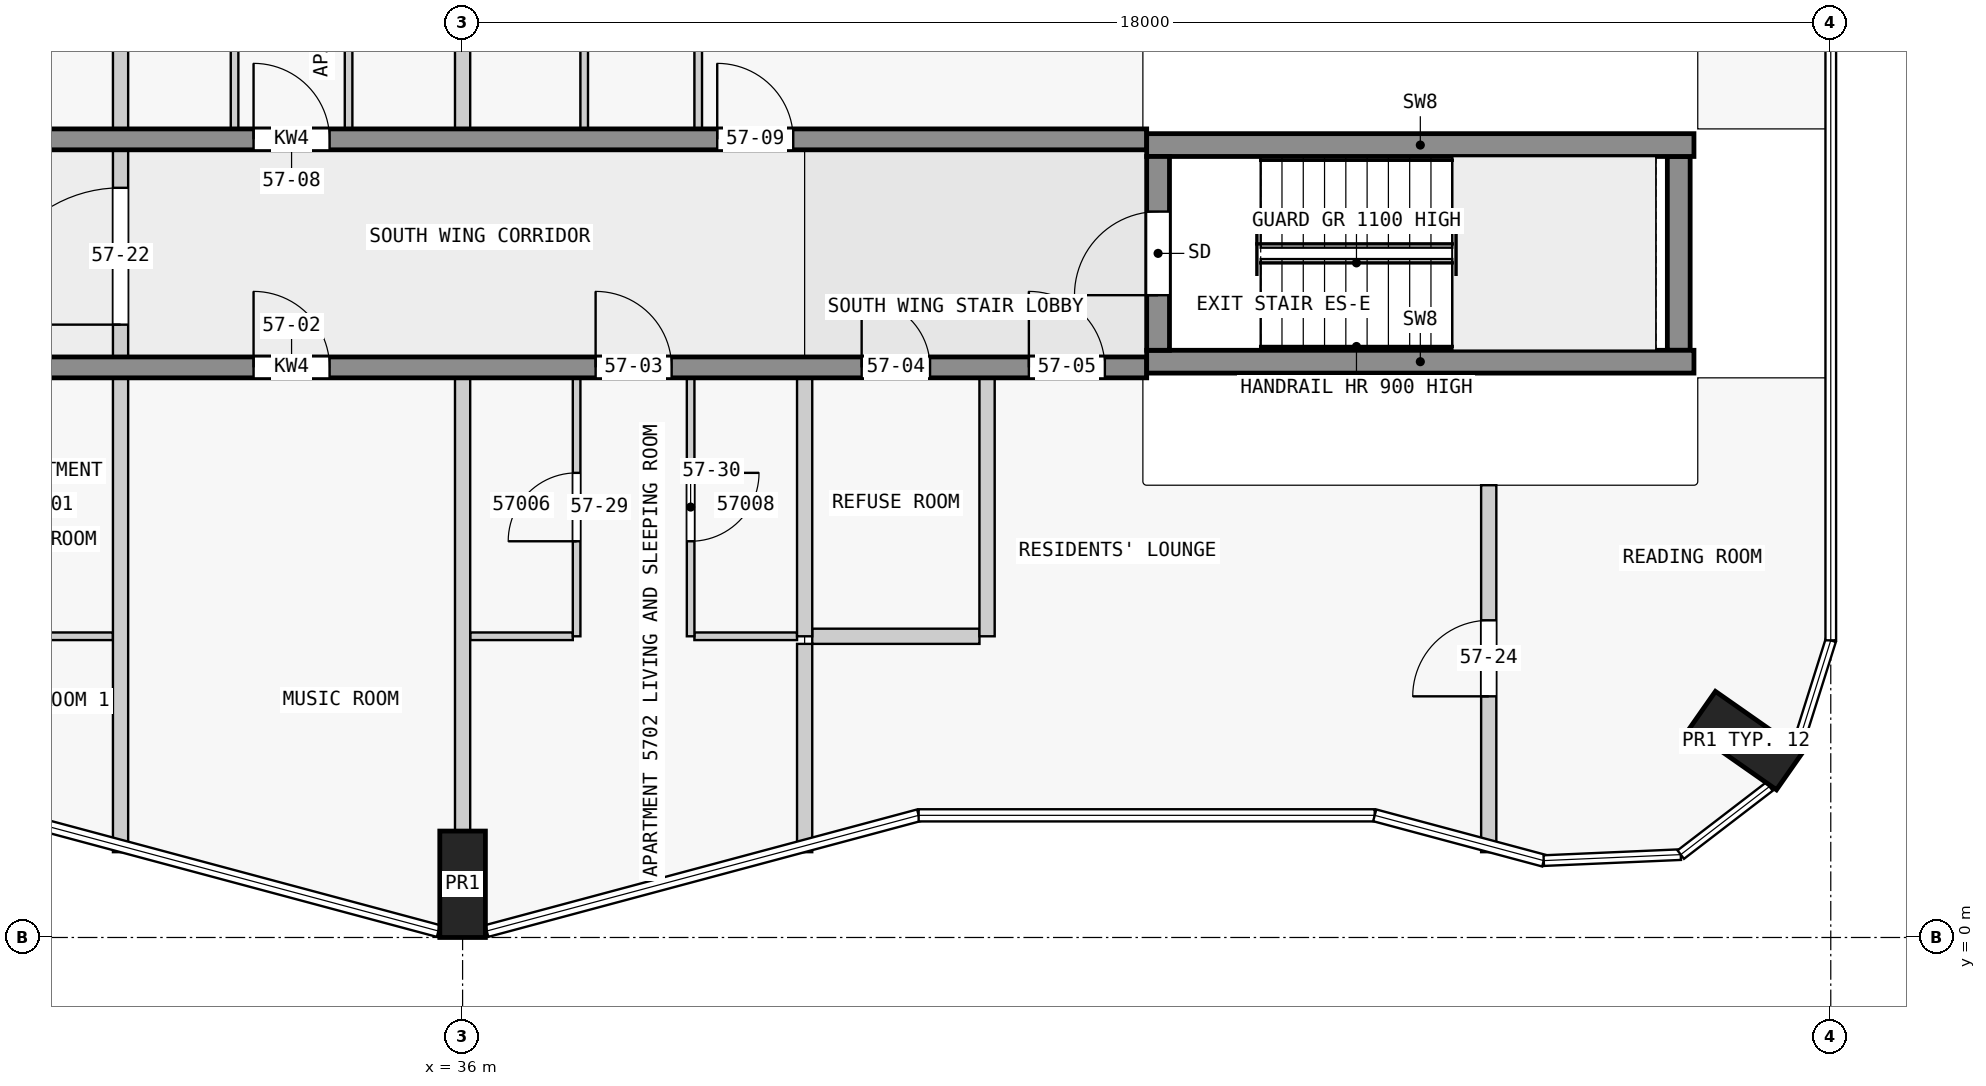
"""IFC4 building model, lengths in metres.
Left out: names, types, materials, properties, quantities, classifications, styles, units other than length and angle.
Written with IfcOpenShell. Run it as: python <this file> out.ifc"""

import sys

from ifc_helpers import new_model, si_unit, direction, frame, frame_2d, origin, origin_2d, place, context, subcontext, project, spatial, rectangle, extrude, element, fill, save


model = new_model("IFC4")
c1 = context("Model", 3, precision=1e-05, world=origin(), true_north=direction((0.0, 1.0)))
c2 = subcontext(c1, "Body", "Model", "MODEL_VIEW")
j1 = project(units=[si_unit("LENGTHUNIT", "METRE"), si_unit("PLANEANGLEUNIT", "RADIAN")], contexts=[c1])
p1 = place(None, origin())
s1 = spatial("IfcSite", under=j1, at=p1, CompositionType="ELEMENT")
p2 = place(p1, origin())
s2 = spatial("IfcBuilding", under=s1, at=p2, CompositionType="ELEMENT")
p3 = place(p2, frame((0.0, 0.0, 218.9)))
s3 = spatial("IfcBuildingStorey", under=s2, at=p3, CompositionType="ELEMENT", Elevation=218.9)
for number, where, z_axis, x_axis in (
    (1, (36.0, 0.7, 0.0), (0.0, 0.0, 1.0), (1.0, 0.0, 0.0)),
    (2, (52.884, 2.59, 0.0), (0.0, 0.0, 1.0), (0.574, 0.819, 0.0)),
):
    element("IfcColumn", number, at=place(p3, frame(where, z_axis=z_axis, x_axis=x_axis)), inside=s3, PredefinedType="COLUMN", context=c2, shape_type="SweptSolid", body=[
        extrude(rectangle(XDim=0.6, YDim=1.4, at=origin_2d()), origin(), (0.0, 0.0, 1.0), 3.5),
    ])
p4 = place(p3, frame((45.15, 7.725, 0.0), z_axis=(0.0, 0.0, 1.0), x_axis=(0.0, 1.0, 0.0)))
e3 = element("IfcWall", 3, at=p4, inside=s3, PredefinedType="SHEAR", context=c2, shape_type="SweptSolid", body=[
    extrude(rectangle(XDim=2.55, YDim=0.3, at=frame_2d((1.275, 0.0))), origin(), (0.0, 0.0, 1.0), 3.5),
])
p5 = place(p4, frame((0.725, 0.0, 0.0)))
e4 = element("IfcOpeningElement", 4, at=p5, cuts=e3, PredefinedType="OPENING", context=c2, shape_type="SweptSolid", body=[
    extrude(rectangle(XDim=1.1, YDim=2.1, at=frame_2d((0.55, 1.05))), frame((0.0, 0.16, 0.0), z_axis=(0.0, -1.0, 0.0), x_axis=(1.0, 0.0, 0.0)), (0.0, 0.0, 1.0), 0.32),
])
p6 = place(p3, frame((52.0, 7.725, 0.0), z_axis=(0.0, 0.0, 1.0), x_axis=(0.0, 1.0, 0.0)))
e5 = element("IfcWall", 5, at=p6, inside=s3, PredefinedType="SHEAR", context=c2, shape_type="SweptSolid", body=[
    extrude(rectangle(XDim=2.55, YDim=0.3, at=frame_2d((1.275, 0.0))), origin(), (0.0, 0.0, 1.0), 3.5),
])
for number, where, z_axis, x_axis in (
    (6, (45.0, 7.575, 0.0), (0.0, 0.0, 1.0), (1.0, 0.0, 0.0)),
    (7, (45.0, 10.425, 0.0), (0.0, 0.0, 1.0), (1.0, 0.0, 0.0)),
):
    element("IfcWall", number, at=place(p3, frame(where, z_axis=z_axis, x_axis=x_axis)), inside=s3, PredefinedType="SHEAR", context=c2, shape_type="SweptSolid", body=[
        extrude(rectangle(XDim=7.2, YDim=0.3, at=frame_2d((3.6, 0.0))), origin(), (0.0, 0.0, 1.0), 3.5),
    ])
p7 = place(p3, frame((22.5, 7.5, 0.0), z_axis=(0.0, 0.0, 1.0), x_axis=(1.0, 0.0, 0.0)))
e8 = element("IfcWall", 8, at=p7, inside=s3, PredefinedType="SHEAR", context=c2, shape_type="SweptSolid", body=[
    extrude(rectangle(XDim=22.5, YDim=0.275, at=frame_2d((11.25, 0.0))), origin(), (0.0, 0.0, 1.0), 3.25),
])
p8 = place(p7, frame((4.05, 0.0, 0.0)))
e9 = element("IfcOpeningElement", 9, at=p8, cuts=e8, PredefinedType="OPENING", context=c2, shape_type="SweptSolid", body=[
    extrude(rectangle(XDim=1.0, YDim=2.1, at=frame_2d((0.5, 1.05))), frame((0.0, 0.147, 0.0), z_axis=(0.0, -1.0, 0.0), x_axis=(1.0, 0.0, 0.0)), (0.0, 0.0, 1.0), 0.295),
])
p9 = place(p7, frame((10.75, 0.0, 0.0)))
e10 = element("IfcOpeningElement", 10, at=p9, cuts=e8, PredefinedType="OPENING", context=c2, shape_type="SweptSolid", body=[
    extrude(rectangle(XDim=1.0, YDim=2.1, at=frame_2d((0.5, 1.05))), frame((0.0, 0.147, 0.0), z_axis=(0.0, -1.0, 0.0), x_axis=(1.0, 0.0, 0.0)), (0.0, 0.0, 1.0), 0.295),
])
p10 = place(p7, frame((15.25, 0.0, 0.0)))
e11 = element("IfcOpeningElement", 11, at=p10, cuts=e8, PredefinedType="OPENING", context=c2, shape_type="SweptSolid", body=[
    extrude(rectangle(XDim=1.0, YDim=2.1, at=frame_2d((0.5, 1.05))), frame((0.0, 0.147, 0.0), z_axis=(0.0, -1.0, 0.0), x_axis=(1.0, 0.0, 0.0)), (0.0, 0.0, 1.0), 0.295),
])
p11 = place(p7, frame((18.75, 0.0, 0.0)))
e12 = element("IfcOpeningElement", 12, at=p11, cuts=e8, PredefinedType="OPENING", context=c2, shape_type="SweptSolid", body=[
    extrude(rectangle(XDim=0.9, YDim=2.1, at=frame_2d((0.45, 1.05))), frame((0.0, 0.147, 0.0), z_axis=(0.0, -1.0, 0.0), x_axis=(1.0, 0.0, 0.0)), (0.0, 0.0, 1.0), 0.295),
])
p12 = place(p7, frame((20.95, 0.0, 0.0)))
e13 = element("IfcOpeningElement", 13, at=p12, cuts=e8, PredefinedType="OPENING", context=c2, shape_type="SweptSolid", body=[
    extrude(rectangle(XDim=1.0, YDim=2.1, at=frame_2d((0.5, 1.05))), frame((0.0, 0.147, 0.0), z_axis=(0.0, -1.0, 0.0), x_axis=(1.0, 0.0, 0.0)), (0.0, 0.0, 1.0), 0.295),
])
p13 = place(p3, frame((22.5, 10.5, 0.0), z_axis=(0.0, 0.0, 1.0), x_axis=(1.0, 0.0, 0.0)))
e14 = element("IfcWall", 14, at=p13, inside=s3, PredefinedType="SHEAR", context=c2, shape_type="SweptSolid", body=[
    extrude(rectangle(XDim=22.5, YDim=0.275, at=frame_2d((11.25, 0.0))), origin(), (0.0, 0.0, 1.0), 3.25),
])
p14 = place(p13, frame((1.75, 0.0, 0.0)))
e15 = element("IfcOpeningElement", 15, at=p14, cuts=e14, PredefinedType="OPENING", context=c2, shape_type="SweptSolid", body=[
    extrude(rectangle(XDim=1.0, YDim=2.1, at=frame_2d((0.5, 1.05))), frame((0.0, 0.147, 0.0), z_axis=(0.0, -1.0, 0.0), x_axis=(1.0, 0.0, 0.0)), (0.0, 0.0, 1.0), 0.295),
])
p15 = place(p13, frame((5.85, 0.0, 0.0)))
e16 = element("IfcOpeningElement", 16, at=p15, cuts=e14, PredefinedType="OPENING", context=c2, shape_type="SweptSolid", body=[
    extrude(rectangle(XDim=1.8, YDim=2.1, at=frame_2d((0.9, 1.05))), frame((0.0, 0.147, 0.0), z_axis=(0.0, -1.0, 0.0), x_axis=(1.0, 0.0, 0.0)), (0.0, 0.0, 1.0), 0.295),
])
p16 = place(p13, frame((10.75, 0.0, 0.0)))
e17 = element("IfcOpeningElement", 17, at=p16, cuts=e14, PredefinedType="OPENING", context=c2, shape_type="SweptSolid", body=[
    extrude(rectangle(XDim=1.0, YDim=2.1, at=frame_2d((0.5, 1.05))), frame((0.0, 0.147, 0.0), z_axis=(0.0, -1.0, 0.0), x_axis=(1.0, 0.0, 0.0)), (0.0, 0.0, 1.0), 0.295),
])
p17 = place(p13, frame((16.85, 0.0, 0.0)))
e18 = element("IfcOpeningElement", 18, at=p17, cuts=e14, PredefinedType="OPENING", context=c2, shape_type="SweptSolid", body=[
    extrude(rectangle(XDim=1.0, YDim=2.1, at=frame_2d((0.5, 1.05))), frame((0.0, 0.147, 0.0), z_axis=(0.0, -1.0, 0.0), x_axis=(1.0, 0.0, 0.0)), (0.0, 0.0, 1.0), 0.295),
])
p18 = place(p3, frame((29.75, 3.962, 0.0), z_axis=(0.0, 0.0, 1.0), x_axis=(1.0, 0.0, 0.0)))
e19 = element("IfcWall", 19, at=p18, inside=s3, PredefinedType="PARTITIONING", context=c2, shape_type="SweptSolid", body=[
    extrude(rectangle(XDim=1.65, YDim=0.1, at=frame_2d((0.825, 0.0))), origin(), (0.0, 0.0, 1.0), 3.25),
])
for number, where, z_axis, x_axis in (
    (20, (36.1, 3.962, 0.0), (0.0, 0.0, 1.0), (1.0, 0.0, 0.0)),
    (21, (39.05, 3.962, 0.0), (0.0, 0.0, 1.0), (1.0, 0.0, 0.0)),
):
    element("IfcWall", number, at=place(p3, frame(where, z_axis=z_axis, x_axis=x_axis)), inside=s3, PredefinedType="PARTITIONING", context=c2, shape_type="SweptSolid", body=[
        extrude(rectangle(XDim=1.35, YDim=0.1, at=frame_2d((0.675, 0.0))), origin(), (0.0, 0.0, 1.0), 3.25),
    ])
p19 = place(p3, frame((40.6, 3.962, 0.0), z_axis=(0.0, 0.0, 1.0), x_axis=(1.0, 0.0, 0.0)))
e22 = element("IfcWall", 22, at=p19, inside=s3, PredefinedType="PARTITIONING", context=c2, shape_type="SweptSolid", body=[
    extrude(rectangle(XDim=2.2, YDim=0.2, at=frame_2d((1.1, 0.0))), origin(), (0.0, 0.0, 1.0), 3.25),
])
for number, where, z_axis, x_axis in (
    (23, (31.5, 1.122, 0.0), (0.0, 0.0, 1.0), (0.0, 1.0, 0.0)),
    (24, (31.5, 10.637, 0.0), (0.0, 0.0, 1.0), (0.0, 1.0, 0.0)),
):
    element("IfcWall", number, at=place(p3, frame(where, z_axis=z_axis, x_axis=x_axis)), inside=s3, PredefinedType="PARTITIONING", context=c2, shape_type="SweptSolid", body=[
        extrude(rectangle(XDim=6.24, YDim=0.2, at=frame_2d((3.12, 0.0))), origin(), (0.0, 0.0, 1.0), 3.25),
    ])
p20 = place(p3, frame((33.0, 10.637, 0.0), z_axis=(0.0, 0.0, 1.0), x_axis=(0.0, 1.0, 0.0)))
e25 = element("IfcWall", 25, at=p20, inside=s3, PredefinedType="PARTITIONING", context=c2, shape_type="SweptSolid", body=[
    extrude(rectangle(XDim=3.4, YDim=0.1, at=frame_2d((1.7, 0.0))), origin(), (0.0, 0.0, 1.0), 3.25),
])
p21 = place(p20, frame((1.25, 0.0, 0.0)))
e26 = element("IfcOpeningElement", 26, at=p21, cuts=e25, PredefinedType="OPENING", context=c2, shape_type="SweptSolid", body=[
    extrude(rectangle(XDim=0.9, YDim=2.1, at=frame_2d((0.45, 1.05))), frame((0.0, 0.06, 0.0), z_axis=(0.0, -1.0, 0.0), x_axis=(1.0, 0.0, 0.0)), (0.0, 0.0, 1.0), 0.12),
])
p22 = place(p3, frame((34.5, 13.988, 0.0), z_axis=(0.0, 0.0, 1.0), x_axis=(0.0, -1.0, 0.0)))
e27 = element("IfcWall", 27, at=p22, inside=s3, PredefinedType="PARTITIONING", context=c2, shape_type="SweptSolid", body=[
    extrude(rectangle(XDim=3.35, YDim=0.1, at=frame_2d((1.675, 0.0))), origin(), (0.0, 0.0, 1.0), 3.25),
])
p23 = place(p22, frame((1.25, 0.0, 0.0)))
e28 = element("IfcOpeningElement", 28, at=p23, cuts=e27, PredefinedType="OPENING", context=c2, shape_type="SweptSolid", body=[
    extrude(rectangle(XDim=0.9, YDim=2.1, at=frame_2d((0.45, 1.05))), frame((0.0, 0.06, 0.0), z_axis=(0.0, -1.0, 0.0), x_axis=(1.0, 0.0, 0.0)), (0.0, 0.0, 1.0), 0.12),
])
p24 = place(p3, frame((36.0, 1.4, 0.0), z_axis=(0.0, 0.0, 1.0), x_axis=(0.0, 1.0, 0.0)))
e29 = element("IfcWall", 29, at=p24, inside=s3, PredefinedType="PARTITIONING", context=c2, shape_type="SweptSolid", body=[
    extrude(rectangle(XDim=5.963, YDim=0.2, at=frame_2d((2.981, 0.0))), origin(), (0.0, 0.0, 1.0), 3.25),
])
p25 = place(p3, frame((36.0, 10.637, 0.0), z_axis=(0.0, 0.0, 1.0), x_axis=(0.0, 1.0, 0.0)))
e30 = element("IfcWall", 30, at=p25, inside=s3, PredefinedType="PARTITIONING", context=c2, shape_type="SweptSolid", body=[
    extrude(rectangle(XDim=3.4, YDim=0.2, at=frame_2d((1.7, 0.0))), origin(), (0.0, 0.0, 1.0), 3.25),
])
p26 = place(p3, frame((37.5, 3.962, 0.0), z_axis=(0.0, 0.0, 1.0), x_axis=(0.0, 1.0, 0.0)))
e31 = element("IfcWall", 31, at=p26, inside=s3, PredefinedType="PARTITIONING", context=c2, shape_type="SweptSolid", body=[
    extrude(rectangle(XDim=3.4, YDim=0.1, at=frame_2d((1.7, 0.0))), origin(), (0.0, 0.0, 1.0), 3.25),
])
p27 = place(p26, frame((1.25, 0.0, 0.0)))
e32 = element("IfcOpeningElement", 32, at=p27, cuts=e31, PredefinedType="OPENING", context=c2, shape_type="SweptSolid", body=[
    extrude(rectangle(XDim=0.9, YDim=2.1, at=frame_2d((0.45, 1.05))), frame((0.0, 0.06, 0.0), z_axis=(0.0, -1.0, 0.0), x_axis=(1.0, 0.0, 0.0)), (0.0, 0.0, 1.0), 0.12),
])
p28 = place(p3, frame((37.6, 10.637, 0.0), z_axis=(0.0, 0.0, 1.0), x_axis=(0.0, 1.0, 0.0)))
e33 = element("IfcWall", 33, at=p28, inside=s3, PredefinedType="PARTITIONING", context=c2, shape_type="SweptSolid", body=[
    extrude(rectangle(XDim=3.35, YDim=0.1, at=frame_2d((1.675, 0.0))), origin(), (0.0, 0.0, 1.0), 3.25),
])
p29 = place(p3, frame((39.0, 7.363, 0.0), z_axis=(0.0, 0.0, 1.0), x_axis=(0.0, -1.0, 0.0)))
e34 = element("IfcWall", 34, at=p29, inside=s3, PredefinedType="PARTITIONING", context=c2, shape_type="SweptSolid", body=[
    extrude(rectangle(XDim=3.4, YDim=0.1, at=frame_2d((1.7, 0.0))), origin(), (0.0, 0.0, 1.0), 3.25),
])
p30 = place(p29, frame((1.25, 0.0, 0.0)))
e35 = element("IfcOpeningElement", 35, at=p30, cuts=e34, PredefinedType="OPENING", context=c2, shape_type="SweptSolid", body=[
    extrude(rectangle(XDim=0.9, YDim=2.1, at=frame_2d((0.45, 1.05))), frame((0.0, 0.06, 0.0), z_axis=(0.0, -1.0, 0.0), x_axis=(1.0, 0.0, 0.0)), (0.0, 0.0, 1.0), 0.12),
])
p31 = place(p3, frame((39.1, 10.637, 0.0), z_axis=(0.0, 0.0, 1.0), x_axis=(0.0, 1.0, 0.0)))
e36 = element("IfcWall", 36, at=p31, inside=s3, PredefinedType="PARTITIONING", context=c2, shape_type="SweptSolid", body=[
    extrude(rectangle(XDim=3.35, YDim=0.1, at=frame_2d((1.675, 0.0))), origin(), (0.0, 0.0, 1.0), 3.25),
])
p32 = place(p31, frame((1.25, 0.0, 0.0)))
e37 = element("IfcOpeningElement", 37, at=p32, cuts=e36, PredefinedType="OPENING", context=c2, shape_type="SweptSolid", body=[
    extrude(rectangle(XDim=0.9, YDim=2.1, at=frame_2d((0.45, 1.05))), frame((0.0, 0.06, 0.0), z_axis=(0.0, -1.0, 0.0), x_axis=(1.0, 0.0, 0.0)), (0.0, 0.0, 1.0), 0.12),
])
p33 = place(p3, frame((40.5, 3.863, 0.0), z_axis=(0.0, 0.0, 1.0), x_axis=(0.0, -1.0, 0.0)))
e38 = element("IfcWall", 38, at=p33, inside=s3, PredefinedType="PARTITIONING", context=c2, shape_type="SweptSolid", body=[
    extrude(rectangle(XDim=2.74, YDim=0.2, at=frame_2d((1.37, 0.0))), origin(), (0.0, 0.0, 1.0), 3.25),
])
for number, where, z_axis, x_axis in (
    (39, (40.5, 3.962, 0.0), (0.0, 0.0, 1.0), (0.0, 1.0, 0.0)),
    (40, (42.9, 3.962, 0.0), (0.0, 0.0, 1.0), (0.0, 1.0, 0.0)),
):
    element("IfcWall", number, at=place(p3, frame(where, z_axis=z_axis, x_axis=x_axis)), inside=s3, PredefinedType="PARTITIONING", context=c2, shape_type="SweptSolid", body=[
        extrude(rectangle(XDim=3.4, YDim=0.2, at=frame_2d((1.7, 0.0))), origin(), (0.0, 0.0, 1.0), 3.25),
    ])
p34 = place(p3, frame((49.5, 1.122, 0.0), z_axis=(0.0, 0.0, 1.0), x_axis=(0.0, 1.0, 0.0)))
e41 = element("IfcWall", 41, at=p34, inside=s3, PredefinedType="PARTITIONING", context=c2, shape_type="SweptSolid", body=[
    extrude(rectangle(XDim=4.828, YDim=0.2, at=frame_2d((2.414, 0.0))), origin(), (0.0, 0.0, 1.0), 3.25),
])
p35 = place(p34, frame((2.05, 0.0, 0.0)))
e42 = element("IfcOpeningElement", 42, at=p35, cuts=e41, PredefinedType="OPENING", context=c2, shape_type="SweptSolid", body=[
    extrude(rectangle(XDim=1.0, YDim=2.1, at=frame_2d((0.5, 1.05))), frame((0.0, 0.11, 0.0), z_axis=(0.0, -1.0, 0.0), x_axis=(1.0, 0.0, 0.0)), (0.0, 0.0, 1.0), 0.22),
])
p36 = place(p3, frame((31.5, 7.462, 0.0), z_axis=(0.0, 0.0, 1.0), x_axis=(0.0, 1.0, 0.0)))
e43 = element("IfcWall", 43, at=p36, inside=s3, PredefinedType="PARTITIONING", context=c2, shape_type="SweptSolid", body=[
    extrude(rectangle(XDim=3.075, YDim=0.2, at=frame_2d((1.538, 0.0))), origin(), (0.0, 0.0, 1.0), 3.25),
])
p37 = place(p36, frame((0.6, 0.0, 0.0)))
e44 = element("IfcOpeningElement", 44, at=p37, cuts=e43, PredefinedType="OPENING", context=c2, shape_type="SweptSolid", body=[
    extrude(rectangle(XDim=1.8, YDim=2.1, at=frame_2d((0.9, 1.05))), frame((0.0, 0.11, 0.0), z_axis=(0.0, -1.0, 0.0), x_axis=(1.0, 0.0, 0.0)), (0.0, 0.0, 1.0), 0.22),
])
p38 = place(p5, origin())
e45 = element("IfcDoor", 45, at=p38, inside=s3, OperationType="SINGLE_SWING_LEFT", PredefinedType="DOOR", context=c2, shape_type="SweptSolid", body=[
    extrude(rectangle(XDim=1.1, YDim=2.1, at=frame_2d((0.55, 1.05))), frame((0.0, 0.025, 0.0), z_axis=(0.0, -1.0, 0.0), x_axis=(1.0, 0.0, 0.0)), (0.0, 0.0, 1.0), 0.05),
])
fill(e4, e45)
p39 = place(p9, origin())
e46 = element("IfcDoor", 46, at=p39, inside=s3, OperationType="SINGLE_SWING_LEFT", PredefinedType="DOOR", context=c2, shape_type="SweptSolid", body=[
    extrude(rectangle(XDim=1.0, YDim=2.1, at=frame_2d((0.5, 1.05))), frame((0.0, 0.025, 0.0), z_axis=(0.0, -1.0, 0.0), x_axis=(1.0, 0.0, 0.0)), (0.0, 0.0, 1.0), 0.05),
])
fill(e10, e46)
p40 = place(p10, origin())
e47 = element("IfcDoor", 47, at=p40, inside=s3, OperationType="SINGLE_SWING_RIGHT", PredefinedType="DOOR", context=c2, shape_type="SweptSolid", body=[
    extrude(rectangle(XDim=1.0, YDim=2.1, at=frame_2d((0.5, 1.05))), frame((0.0, 0.025, 0.0), z_axis=(0.0, -1.0, 0.0), x_axis=(1.0, 0.0, 0.0)), (0.0, 0.0, 1.0), 0.05),
])
fill(e11, e47)
p41 = place(p11, origin())
e48 = element("IfcDoor", 48, at=p41, inside=s3, OperationType="SINGLE_SWING_RIGHT", PredefinedType="DOOR", context=c2, shape_type="SweptSolid", body=[
    extrude(rectangle(XDim=0.9, YDim=2.1, at=frame_2d((0.45, 1.05))), frame((0.0, 0.025, 0.0), z_axis=(0.0, -1.0, 0.0), x_axis=(1.0, 0.0, 0.0)), (0.0, 0.0, 1.0), 0.05),
])
fill(e12, e48)
p42 = place(p12, origin())
e49 = element("IfcDoor", 49, at=p42, inside=s3, OperationType="SINGLE_SWING_RIGHT", PredefinedType="DOOR", context=c2, shape_type="SweptSolid", body=[
    extrude(rectangle(XDim=1.0, YDim=2.1, at=frame_2d((0.5, 1.05))), frame((0.0, 0.025, 0.0), z_axis=(0.0, -1.0, 0.0), x_axis=(1.0, 0.0, 0.0)), (0.0, 0.0, 1.0), 0.05),
])
fill(e13, e49)
p43 = place(p16, origin())
e50 = element("IfcDoor", 50, at=p43, inside=s3, OperationType="SINGLE_SWING_LEFT", PredefinedType="DOOR", context=c2, shape_type="SweptSolid", body=[
    extrude(rectangle(XDim=1.0, YDim=2.1, at=frame_2d((0.5, 1.05))), frame((0.0, 0.025, 0.0), z_axis=(0.0, -1.0, 0.0), x_axis=(1.0, 0.0, 0.0)), (0.0, 0.0, 1.0), 0.05),
])
fill(e17, e50)
p44 = place(p17, origin())
e51 = element("IfcDoor", 51, at=p44, inside=s3, OperationType="SINGLE_SWING_RIGHT", PredefinedType="DOOR", context=c2, shape_type="SweptSolid", body=[
    extrude(rectangle(XDim=1.0, YDim=2.1, at=frame_2d((0.5, 1.05))), frame((0.0, 0.025, 0.0), z_axis=(0.0, -1.0, 0.0), x_axis=(1.0, 0.0, 0.0)), (0.0, 0.0, 1.0), 0.05),
])
fill(e18, e51)
p45 = place(p37, origin())
e52 = element("IfcDoor", 52, at=p45, inside=s3, OperationType="SINGLE_SWING_LEFT", PredefinedType="DOOR", context=c2, shape_type="SweptSolid", body=[
    extrude(rectangle(XDim=1.8, YDim=2.1, at=frame_2d((0.9, 1.05))), frame((0.0, 0.025, 0.0), z_axis=(0.0, -1.0, 0.0), x_axis=(1.0, 0.0, 0.0)), (0.0, 0.0, 1.0), 0.05),
])
fill(e44, e52)
p46 = place(p35, origin())
e53 = element("IfcDoor", 53, at=p46, inside=s3, OperationType="SINGLE_SWING_RIGHT", PredefinedType="DOOR", context=c2, shape_type="SweptSolid", body=[
    extrude(rectangle(XDim=1.0, YDim=2.1, at=frame_2d((0.5, 1.05))), frame((0.0, 0.025, 0.0), z_axis=(0.0, -1.0, 0.0), x_axis=(1.0, 0.0, 0.0)), (0.0, 0.0, 1.0), 0.05),
])
fill(e42, e53)
p47 = place(p27, origin())
e54 = element("IfcDoor", 54, at=p47, inside=s3, OperationType="SINGLE_SWING_LEFT", PredefinedType="DOOR", context=c2, shape_type="SweptSolid", body=[
    extrude(rectangle(XDim=0.9, YDim=2.1, at=frame_2d((0.45, 1.05))), frame((0.0, 0.025, 0.0), z_axis=(0.0, -1.0, 0.0), x_axis=(1.0, 0.0, 0.0)), (0.0, 0.0, 1.0), 0.05),
])
fill(e32, e54)
p48 = place(p30, origin())
e55 = element("IfcDoor", 55, at=p48, inside=s3, OperationType="SINGLE_SWING_LEFT", PredefinedType="DOOR", context=c2, shape_type="SweptSolid", body=[
    extrude(rectangle(XDim=0.9, YDim=2.1, at=frame_2d((0.45, 1.05))), frame((0.0, 0.025, 0.0), z_axis=(0.0, -1.0, 0.0), x_axis=(1.0, 0.0, 0.0)), (0.0, 0.0, 1.0), 0.05),
])
fill(e35, e55)
save(model, sys.argv[1])
